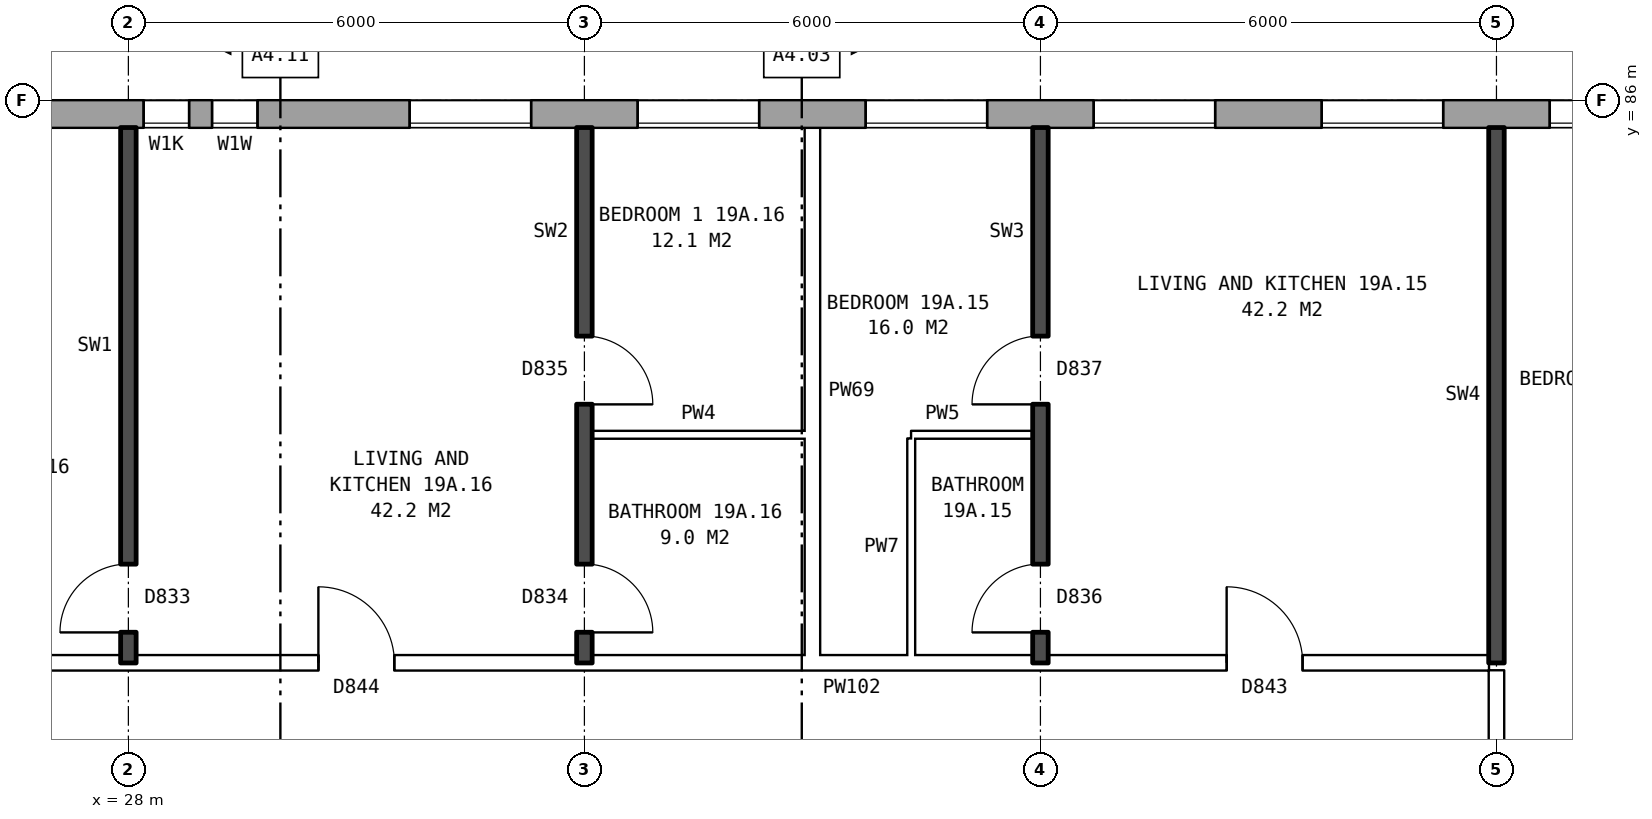
"""IFC4 building model, lengths in metres.
Left out: names, types, materials, properties, quantities, classifications, styles, units other than length and angle.
Written with IfcOpenShell. Run it as: python <this file> out.ifc"""

import sys

from ifc_helpers import new_model, si_unit, direction, frame, frame_2d, origin, place, context, subcontext, project, spatial, rectangle, extrude, element, fill, save


model = new_model("IFC4")
c1 = context("Model", 3, precision=1e-05, world=origin(), true_north=direction((0.0, 1.0)))
c2 = subcontext(c1, "Body", "Model", "MODEL_VIEW")
j1 = project(units=[si_unit("LENGTHUNIT", "METRE"), si_unit("PLANEANGLEUNIT", "RADIAN")], contexts=[c1])
p1 = place(None, origin())
s1 = spatial("IfcSite", under=j1, at=p1, CompositionType="ELEMENT")
p2 = place(p1, origin())
s2 = spatial("IfcBuilding", under=s1, at=p2, CompositionType="ELEMENT")
p3 = place(p2, frame((0.0, 0.0, 71.6)))
s3 = spatial("IfcBuildingStorey", under=s2, at=p3, CompositionType="ELEMENT", Elevation=71.6)
p4 = place(p3, frame((72.925, 85.82, 0.0), z_axis=(0.0, 0.0, 1.0), x_axis=(-1.0, 0.0, 0.0)))
e1 = element("IfcWall", 1, at=p4, inside=s3, PredefinedType="STANDARD", context=c2, shape_type="SweptSolid", body=[
    extrude(rectangle(XDim=46.601, YDim=0.36, at=frame_2d((23.3, 0.0))), origin(), (0.0, 0.0, 1.0), 2.85),
])
p5 = place(p4, frame((0.625, 0.0, 0.8)))
e2 = element("IfcOpeningElement", 2, at=p5, cuts=e1, PredefinedType="OPENING", context=c2, shape_type="SweptSolid", body=[
    extrude(rectangle(XDim=1.6, YDim=1.8, at=frame_2d((0.8, 0.9))), frame((0.0, 0.19, 0.0), z_axis=(0.0, -1.0, 0.0), x_axis=(1.0, 0.0, 0.0)), (0.0, 0.0, 1.0), 0.38),
])
p6 = place(p4, frame((4.625, 0.0, 0.8)))
e3 = element("IfcOpeningElement", 3, at=p6, cuts=e1, PredefinedType="OPENING", context=c2, shape_type="SweptSolid", body=[
    extrude(rectangle(XDim=0.8, YDim=0.9, at=frame_2d((0.4, 0.45))), frame((0.0, 0.19, 0.0), z_axis=(0.0, -1.0, 0.0), x_axis=(1.0, 0.0, 0.0)), (0.0, 0.0, 1.0), 0.38),
])
p7 = place(p4, frame((6.625, 0.0, 0.8)))
e4 = element("IfcOpeningElement", 4, at=p7, cuts=e1, PredefinedType="OPENING", context=c2, shape_type="SweptSolid", body=[
    extrude(rectangle(XDim=1.6, YDim=1.8, at=frame_2d((0.8, 0.9))), frame((0.0, 0.19, 0.0), z_axis=(0.0, -1.0, 0.0), x_axis=(1.0, 0.0, 0.0)), (0.0, 0.0, 1.0), 0.38),
])
p8 = place(p4, frame((9.625, 0.0, 0.8)))
e5 = element("IfcOpeningElement", 5, at=p8, cuts=e1, PredefinedType="OPENING", context=c2, shape_type="SweptSolid", body=[
    extrude(rectangle(XDim=1.6, YDim=1.8, at=frame_2d((0.8, 0.9))), frame((0.0, 0.19, 0.0), z_axis=(0.0, -1.0, 0.0), x_axis=(1.0, 0.0, 0.0)), (0.0, 0.0, 1.0), 0.38),
])
p9 = place(p4, frame((12.625, 0.0, 0.8)))
e6 = element("IfcOpeningElement", 6, at=p9, cuts=e1, PredefinedType="OPENING", context=c2, shape_type="SweptSolid", body=[
    extrude(rectangle(XDim=1.6, YDim=1.8, at=frame_2d((0.8, 0.9))), frame((0.0, 0.19, 0.0), z_axis=(0.0, -1.0, 0.0), x_axis=(1.0, 0.0, 0.0)), (0.0, 0.0, 1.0), 0.38),
])
p10 = place(p4, frame((15.625, 0.0, 0.8)))
e7 = element("IfcOpeningElement", 7, at=p10, cuts=e1, PredefinedType="OPENING", context=c2, shape_type="SweptSolid", body=[
    extrude(rectangle(XDim=1.6, YDim=1.8, at=frame_2d((0.8, 0.9))), frame((0.0, 0.19, 0.0), z_axis=(0.0, -1.0, 0.0), x_axis=(1.0, 0.0, 0.0)), (0.0, 0.0, 1.0), 0.38),
])
p11 = place(p4, frame((18.625, 0.0, 0.8)))
e8 = element("IfcOpeningElement", 8, at=p11, cuts=e1, PredefinedType="OPENING", context=c2, shape_type="SweptSolid", body=[
    extrude(rectangle(XDim=1.6, YDim=1.8, at=frame_2d((0.8, 0.9))), frame((0.0, 0.19, 0.0), z_axis=(0.0, -1.0, 0.0), x_axis=(1.0, 0.0, 0.0)), (0.0, 0.0, 1.0), 0.38),
])
p12 = place(p4, frame((21.625, 0.0, 0.8)))
e9 = element("IfcOpeningElement", 9, at=p12, cuts=e1, PredefinedType="OPENING", context=c2, shape_type="SweptSolid", body=[
    extrude(rectangle(XDim=1.6, YDim=1.8, at=frame_2d((0.8, 0.9))), frame((0.0, 0.19, 0.0), z_axis=(0.0, -1.0, 0.0), x_axis=(1.0, 0.0, 0.0)), (0.0, 0.0, 1.0), 0.38),
])
p13 = place(p4, frame((24.625, 0.0, 0.8)))
e10 = element("IfcOpeningElement", 10, at=p13, cuts=e1, PredefinedType="OPENING", context=c2, shape_type="SweptSolid", body=[
    extrude(rectangle(XDim=1.6, YDim=1.8, at=frame_2d((0.8, 0.9))), frame((0.0, 0.19, 0.0), z_axis=(0.0, -1.0, 0.0), x_axis=(1.0, 0.0, 0.0)), (0.0, 0.0, 1.0), 0.38),
])
p14 = place(p4, frame((27.625, 0.0, 0.8)))
e11 = element("IfcOpeningElement", 11, at=p14, cuts=e1, PredefinedType="OPENING", context=c2, shape_type="SweptSolid", body=[
    extrude(rectangle(XDim=1.6, YDim=1.8, at=frame_2d((0.8, 0.9))), frame((0.0, 0.19, 0.0), z_axis=(0.0, -1.0, 0.0), x_axis=(1.0, 0.0, 0.0)), (0.0, 0.0, 1.0), 0.38),
])
p15 = place(p4, frame((30.625, 0.0, 0.8)))
e12 = element("IfcOpeningElement", 12, at=p15, cuts=e1, PredefinedType="OPENING", context=c2, shape_type="SweptSolid", body=[
    extrude(rectangle(XDim=1.6, YDim=1.8, at=frame_2d((0.8, 0.9))), frame((0.0, 0.19, 0.0), z_axis=(0.0, -1.0, 0.0), x_axis=(1.0, 0.0, 0.0)), (0.0, 0.0, 1.0), 0.38),
])
p16 = place(p4, frame((33.625, 0.0, 0.8)))
e13 = element("IfcOpeningElement", 13, at=p16, cuts=e1, PredefinedType="OPENING", context=c2, shape_type="SweptSolid", body=[
    extrude(rectangle(XDim=1.6, YDim=1.8, at=frame_2d((0.8, 0.9))), frame((0.0, 0.19, 0.0), z_axis=(0.0, -1.0, 0.0), x_axis=(1.0, 0.0, 0.0)), (0.0, 0.0, 1.0), 0.38),
])
p17 = place(p4, frame((36.625, 0.0, 0.8)))
e14 = element("IfcOpeningElement", 14, at=p17, cuts=e1, PredefinedType="OPENING", context=c2, shape_type="SweptSolid", body=[
    extrude(rectangle(XDim=1.6, YDim=1.8, at=frame_2d((0.8, 0.9))), frame((0.0, 0.19, 0.0), z_axis=(0.0, -1.0, 0.0), x_axis=(1.0, 0.0, 0.0)), (0.0, 0.0, 1.0), 0.38),
])
p18 = place(p4, frame((39.625, 0.0, 0.8)))
e15 = element("IfcOpeningElement", 15, at=p18, cuts=e1, PredefinedType="OPENING", context=c2, shape_type="SweptSolid", body=[
    extrude(rectangle(XDim=1.6, YDim=1.8, at=frame_2d((0.8, 0.9))), frame((0.0, 0.19, 0.0), z_axis=(0.0, -1.0, 0.0), x_axis=(1.0, 0.0, 0.0)), (0.0, 0.0, 1.0), 0.38),
])
p19 = place(p4, frame((43.225, 0.0, 1.7)))
e16 = element("IfcOpeningElement", 16, at=p19, cuts=e1, PredefinedType="OPENING", context=c2, shape_type="SweptSolid", body=[
    extrude(rectangle(XDim=0.6, YDim=0.9, at=frame_2d((0.3, 0.45))), frame((0.0, 0.19, 0.0), z_axis=(0.0, -1.0, 0.0), x_axis=(1.0, 0.0, 0.0)), (0.0, 0.0, 1.0), 0.38),
])
p20 = place(p4, frame((5.725, 0.0, 0.8)))
e17 = element("IfcOpeningElement", 17, at=p20, cuts=e1, PredefinedType="OPENING", context=c2, shape_type="SweptSolid", body=[
    extrude(rectangle(XDim=0.6, YDim=1.8, at=frame_2d((0.3, 0.9))), frame((0.0, 0.19, 0.0), z_axis=(0.0, -1.0, 0.0), x_axis=(1.0, 0.0, 0.0)), (0.0, 0.0, 1.0), 0.38),
])
p21 = place(p4, frame((44.125, 0.0, 1.0)))
e18 = element("IfcOpeningElement", 18, at=p21, cuts=e1, PredefinedType="OPENING", context=c2, shape_type="SweptSolid", body=[
    extrude(rectangle(XDim=0.6, YDim=1.5, at=frame_2d((0.3, 0.75))), frame((0.0, 0.19, 0.0), z_axis=(0.0, -1.0, 0.0), x_axis=(1.0, 0.0, 0.0)), (0.0, 0.0, 1.0), 0.38),
])
p22 = place(p3, frame((23.61, 78.6, 0.0), z_axis=(0.0, 0.0, 1.0), x_axis=(1.0, 0.0, 0.0)))
e19 = element("IfcWall", 19, at=p22, inside=s3, PredefinedType="PARTITIONING", context=c2, shape_type="SweptSolid", body=[
    extrude(rectangle(XDim=22.29, YDim=0.2, at=frame_2d((11.145, 0.0))), origin(), (0.0, 0.0, 1.0), 2.85),
])
p23 = place(p22, frame((18.84, 0.0, 0.0)))
e20 = element("IfcOpeningElement", 20, at=p23, cuts=e19, PredefinedType="OPENING", context=c2, shape_type="SweptSolid", body=[
    extrude(rectangle(XDim=1.0, YDim=2.1, at=frame_2d((0.5, 1.05))), frame((0.0, 0.11, 0.0), z_axis=(0.0, -1.0, 0.0), x_axis=(1.0, 0.0, 0.0)), (0.0, 0.0, 1.0), 0.22),
])
p24 = place(p22, frame((6.89, 0.0, 0.0)))
e21 = element("IfcOpeningElement", 21, at=p24, cuts=e19, PredefinedType="OPENING", context=c2, shape_type="SweptSolid", body=[
    extrude(rectangle(XDim=1.0, YDim=2.1, at=frame_2d((0.5, 1.05))), frame((0.0, 0.11, 0.0), z_axis=(0.0, -1.0, 0.0), x_axis=(1.0, 0.0, 0.0)), (0.0, 0.0, 1.0), 0.22),
])
p25 = place(p3, frame((34.1, 81.6, 0.0), z_axis=(0.0, 0.0, 1.0), x_axis=(1.0, 0.0, 0.0)))
e22 = element("IfcWall", 22, at=p25, inside=s3, PredefinedType="PARTITIONING", context=c2, shape_type="SweptSolid", body=[
    extrude(rectangle(XDim=2.8, YDim=0.1, at=frame_2d((1.4, 0.0))), origin(), (0.0, 0.0, 1.0), 2.85),
])
p26 = place(p3, frame((38.3, 81.6, 0.0), z_axis=(0.0, 0.0, 1.0), x_axis=(1.0, 0.0, 0.0)))
e23 = element("IfcWall", 23, at=p26, inside=s3, PredefinedType="PARTITIONING", context=c2, shape_type="SweptSolid", body=[
    extrude(rectangle(XDim=1.6, YDim=0.1, at=frame_2d((0.8, 0.0))), origin(), (0.0, 0.0, 1.0), 2.85),
])
p27 = place(p3, frame((28.0, 78.6, 0.0), z_axis=(0.0, 0.0, 1.0), x_axis=(0.0, 1.0, 0.0)))
e24 = element("IfcWall", 24, at=p27, inside=s3, PredefinedType="SOLIDWALL", context=c2, shape_type="SweptSolid", body=[
    extrude(rectangle(XDim=7.04, YDim=0.2, at=frame_2d((3.52, 0.0))), origin(), (0.0, 0.0, 1.0), 2.85),
])
p28 = place(p27, frame((0.4, 0.0, 0.0)))
e25 = element("IfcOpeningElement", 25, at=p28, cuts=e24, PredefinedType="OPENING", context=c2, shape_type="SweptSolid", body=[
    extrude(rectangle(XDim=0.9, YDim=2.1, at=frame_2d((0.45, 1.05))), frame((0.0, 0.11, 0.0), z_axis=(0.0, -1.0, 0.0), x_axis=(1.0, 0.0, 0.0)), (0.0, 0.0, 1.0), 0.22),
])
p29 = place(p3, frame((34.0, 78.6, 0.0), z_axis=(0.0, 0.0, 1.0), x_axis=(0.0, 1.0, 0.0)))
e26 = element("IfcWall", 26, at=p29, inside=s3, PredefinedType="SOLIDWALL", context=c2, shape_type="SweptSolid", body=[
    extrude(rectangle(XDim=7.04, YDim=0.2, at=frame_2d((3.52, 0.0))), origin(), (0.0, 0.0, 1.0), 2.85),
])
p30 = place(p29, frame((3.4, 0.0, 0.0)))
e27 = element("IfcOpeningElement", 27, at=p30, cuts=e26, PredefinedType="OPENING", context=c2, shape_type="SweptSolid", body=[
    extrude(rectangle(XDim=0.9, YDim=2.1, at=frame_2d((0.45, 1.05))), frame((0.0, 0.11, 0.0), z_axis=(0.0, -1.0, 0.0), x_axis=(1.0, 0.0, 0.0)), (0.0, 0.0, 1.0), 0.22),
])
p31 = place(p29, frame((0.4, 0.0, 0.0)))
e28 = element("IfcOpeningElement", 28, at=p31, cuts=e26, PredefinedType="OPENING", context=c2, shape_type="SweptSolid", body=[
    extrude(rectangle(XDim=0.9, YDim=2.1, at=frame_2d((0.45, 1.05))), frame((0.0, 0.11, 0.0), z_axis=(0.0, -1.0, 0.0), x_axis=(1.0, 0.0, 0.0)), (0.0, 0.0, 1.0), 0.22),
])
p32 = place(p3, frame((37.0, 78.7, 0.0), z_axis=(0.0, 0.0, 1.0), x_axis=(0.0, 1.0, 0.0)))
e29 = element("IfcWall", 29, at=p32, inside=s3, PredefinedType="PARTITIONING", context=c2, shape_type="SweptSolid", body=[
    extrude(rectangle(XDim=6.94, YDim=0.2, at=frame_2d((3.47, 0.0))), origin(), (0.0, 0.0, 1.0), 2.85),
])
p33 = place(p3, frame((38.3, 78.7, 0.0), z_axis=(0.0, 0.0, 1.0), x_axis=(0.0, 1.0, 0.0)))
e30 = element("IfcWall", 30, at=p33, inside=s3, PredefinedType="PARTITIONING", context=c2, shape_type="SweptSolid", body=[
    extrude(rectangle(XDim=2.85, YDim=0.1, at=frame_2d((1.425, 0.0))), origin(), (0.0, 0.0, 1.0), 2.85),
])
p34 = place(p3, frame((40.0, 78.6, 0.0), z_axis=(0.0, 0.0, 1.0), x_axis=(0.0, 1.0, 0.0)))
e31 = element("IfcWall", 31, at=p34, inside=s3, PredefinedType="SOLIDWALL", context=c2, shape_type="SweptSolid", body=[
    extrude(rectangle(XDim=7.04, YDim=0.2, at=frame_2d((3.52, 0.0))), origin(), (0.0, 0.0, 1.0), 2.85),
])
p35 = place(p34, frame((3.4, 0.0, 0.0)))
e32 = element("IfcOpeningElement", 32, at=p35, cuts=e31, PredefinedType="OPENING", context=c2, shape_type="SweptSolid", body=[
    extrude(rectangle(XDim=0.9, YDim=2.1, at=frame_2d((0.45, 1.05))), frame((0.0, 0.11, 0.0), z_axis=(0.0, -1.0, 0.0), x_axis=(1.0, 0.0, 0.0)), (0.0, 0.0, 1.0), 0.22),
])
p36 = place(p34, frame((0.4, 0.0, 0.0)))
e33 = element("IfcOpeningElement", 33, at=p36, cuts=e31, PredefinedType="OPENING", context=c2, shape_type="SweptSolid", body=[
    extrude(rectangle(XDim=0.9, YDim=2.1, at=frame_2d((0.45, 1.05))), frame((0.0, 0.11, 0.0), z_axis=(0.0, -1.0, 0.0), x_axis=(1.0, 0.0, 0.0)), (0.0, 0.0, 1.0), 0.22),
])
p37 = place(p3, frame((46.0, 76.3, 0.0), z_axis=(0.0, 0.0, 1.0), x_axis=(0.0, 1.0, 0.0)))
e34 = element("IfcWall", 34, at=p37, inside=s3, PredefinedType="PARTITIONING", context=c2, shape_type="SweptSolid", body=[
    extrude(rectangle(XDim=2.2, YDim=0.2, at=frame_2d((1.1, 0.0))), origin(), (0.0, 0.0, 1.0), 2.85),
])
p38 = place(p3, frame((46.0, 78.6, 0.0), z_axis=(0.0, 0.0, 1.0), x_axis=(0.0, 1.0, 0.0)))
e35 = element("IfcWall", 35, at=p38, inside=s3, PredefinedType="SOLIDWALL", context=c2, shape_type="SweptSolid", body=[
    extrude(rectangle(XDim=7.04, YDim=0.2, at=frame_2d((3.52, 0.0))), origin(), (0.0, 0.0, 1.0), 2.85),
])
p39 = place(p13, origin())
e36 = element("IfcWindow", 36, at=p39, inside=s3, PartitioningType="SINGLE_PANEL", PredefinedType="WINDOW", context=c2, shape_type="SweptSolid", body=[
    extrude(rectangle(XDim=1.6, YDim=1.8, at=frame_2d((0.8, 0.9))), frame((0.0, 0.15, 0.0), z_axis=(0.0, -1.0, 0.0), x_axis=(1.0, 0.0, 0.0)), (0.0, 0.0, 1.0), 0.06),
])
fill(e10, e36)
p40 = place(p14, origin())
e37 = element("IfcWindow", 37, at=p40, inside=s3, PartitioningType="SINGLE_PANEL", PredefinedType="WINDOW", context=c2, shape_type="SweptSolid", body=[
    extrude(rectangle(XDim=1.6, YDim=1.8, at=frame_2d((0.8, 0.9))), frame((0.0, 0.15, 0.0), z_axis=(0.0, -1.0, 0.0), x_axis=(1.0, 0.0, 0.0)), (0.0, 0.0, 1.0), 0.06),
])
fill(e11, e37)
p41 = place(p15, origin())
e38 = element("IfcWindow", 38, at=p41, inside=s3, PartitioningType="SINGLE_PANEL", PredefinedType="WINDOW", context=c2, shape_type="SweptSolid", body=[
    extrude(rectangle(XDim=1.6, YDim=1.8, at=frame_2d((0.8, 0.9))), frame((0.0, 0.15, 0.0), z_axis=(0.0, -1.0, 0.0), x_axis=(1.0, 0.0, 0.0)), (0.0, 0.0, 1.0), 0.06),
])
fill(e12, e38)
p42 = place(p16, origin())
e39 = element("IfcWindow", 39, at=p42, inside=s3, PartitioningType="SINGLE_PANEL", PredefinedType="WINDOW", context=c2, shape_type="SweptSolid", body=[
    extrude(rectangle(XDim=1.6, YDim=1.8, at=frame_2d((0.8, 0.9))), frame((0.0, 0.15, 0.0), z_axis=(0.0, -1.0, 0.0), x_axis=(1.0, 0.0, 0.0)), (0.0, 0.0, 1.0), 0.06),
])
fill(e13, e39)
p43 = place(p17, origin())
e40 = element("IfcWindow", 40, at=p43, inside=s3, PartitioningType="SINGLE_PANEL", PredefinedType="WINDOW", context=c2, shape_type="SweptSolid", body=[
    extrude(rectangle(XDim=1.6, YDim=1.8, at=frame_2d((0.8, 0.9))), frame((0.0, 0.15, 0.0), z_axis=(0.0, -1.0, 0.0), x_axis=(1.0, 0.0, 0.0)), (0.0, 0.0, 1.0), 0.06),
])
fill(e14, e40)
p44 = place(p18, origin())
e41 = element("IfcWindow", 41, at=p44, inside=s3, PartitioningType="SINGLE_PANEL", PredefinedType="WINDOW", context=c2, shape_type="SweptSolid", body=[
    extrude(rectangle(XDim=1.6, YDim=1.8, at=frame_2d((0.8, 0.9))), frame((0.0, 0.15, 0.0), z_axis=(0.0, -1.0, 0.0), x_axis=(1.0, 0.0, 0.0)), (0.0, 0.0, 1.0), 0.06),
])
fill(e15, e41)
p45 = place(p19, origin())
e42 = element("IfcWindow", 42, at=p45, inside=s3, PartitioningType="SINGLE_PANEL", PredefinedType="WINDOW", context=c2, shape_type="SweptSolid", body=[
    extrude(rectangle(XDim=0.6, YDim=0.9, at=frame_2d((0.3, 0.45))), frame((0.0, 0.15, 0.0), z_axis=(0.0, -1.0, 0.0), x_axis=(1.0, 0.0, 0.0)), (0.0, 0.0, 1.0), 0.06),
])
fill(e16, e42)
p46 = place(p35, origin())
e43 = element("IfcDoor", 43, at=p46, inside=s3, OperationType="SINGLE_SWING_LEFT", PredefinedType="DOOR", context=c2, shape_type="SweptSolid", body=[
    extrude(rectangle(XDim=0.9, YDim=2.1, at=frame_2d((0.45, 1.05))), frame((0.0, 0.025, 0.0), z_axis=(0.0, -1.0, 0.0), x_axis=(1.0, 0.0, 0.0)), (0.0, 0.0, 1.0), 0.05),
])
fill(e32, e43)
p47 = place(p23, origin())
e44 = element("IfcDoor", 44, at=p47, inside=s3, OperationType="SINGLE_SWING_LEFT", PredefinedType="DOOR", context=c2, shape_type="SweptSolid", body=[
    extrude(rectangle(XDim=1.0, YDim=2.1, at=frame_2d((0.5, 1.05))), frame((0.0, 0.025, 0.0), z_axis=(0.0, -1.0, 0.0), x_axis=(1.0, 0.0, 0.0)), (0.0, 0.0, 1.0), 0.05),
])
fill(e20, e44)
p48 = place(p36, origin())
e45 = element("IfcDoor", 45, at=p48, inside=s3, OperationType="SINGLE_SWING_LEFT", PredefinedType="DOOR", context=c2, shape_type="SweptSolid", body=[
    extrude(rectangle(XDim=0.9, YDim=2.1, at=frame_2d((0.45, 1.05))), frame((0.0, 0.025, 0.0), z_axis=(0.0, -1.0, 0.0), x_axis=(1.0, 0.0, 0.0)), (0.0, 0.0, 1.0), 0.05),
])
fill(e33, e45)
p49 = place(p30, frame((0.9, 0.0, 0.0), z_axis=(0.0, 0.0, 1.0), x_axis=(-1.0, 0.0, 0.0)))
e46 = element("IfcDoor", 46, at=p49, inside=s3, OperationType="SINGLE_SWING_RIGHT", PredefinedType="DOOR", context=c2, shape_type="SweptSolid", body=[
    extrude(rectangle(XDim=0.9, YDim=2.1, at=frame_2d((0.45, 1.05))), frame((0.0, 0.025, 0.0), z_axis=(0.0, -1.0, 0.0), x_axis=(1.0, 0.0, 0.0)), (0.0, 0.0, 1.0), 0.05),
])
fill(e27, e46)
p50 = place(p28, origin())
e47 = element("IfcDoor", 47, at=p50, inside=s3, OperationType="SINGLE_SWING_LEFT", PredefinedType="DOOR", context=c2, shape_type="SweptSolid", body=[
    extrude(rectangle(XDim=0.9, YDim=2.1, at=frame_2d((0.45, 1.05))), frame((0.0, 0.025, 0.0), z_axis=(0.0, -1.0, 0.0), x_axis=(1.0, 0.0, 0.0)), (0.0, 0.0, 1.0), 0.05),
])
fill(e25, e47)
p51 = place(p24, origin())
e48 = element("IfcDoor", 48, at=p51, inside=s3, OperationType="SINGLE_SWING_LEFT", PredefinedType="DOOR", context=c2, shape_type="SweptSolid", body=[
    extrude(rectangle(XDim=1.0, YDim=2.1, at=frame_2d((0.5, 1.05))), frame((0.0, 0.025, 0.0), z_axis=(0.0, -1.0, 0.0), x_axis=(1.0, 0.0, 0.0)), (0.0, 0.0, 1.0), 0.05),
])
fill(e21, e48)
p52 = place(p31, frame((0.9, 0.0, 0.0), z_axis=(0.0, 0.0, 1.0), x_axis=(-1.0, 0.0, 0.0)))
e49 = element("IfcDoor", 49, at=p52, inside=s3, OperationType="SINGLE_SWING_RIGHT", PredefinedType="DOOR", context=c2, shape_type="SweptSolid", body=[
    extrude(rectangle(XDim=0.9, YDim=2.1, at=frame_2d((0.45, 1.05))), frame((0.0, 0.025, 0.0), z_axis=(0.0, -1.0, 0.0), x_axis=(1.0, 0.0, 0.0)), (0.0, 0.0, 1.0), 0.05),
])
fill(e28, e49)
p53 = place(p21, origin())
e50 = element("IfcWindow", 50, at=p53, inside=s3, PartitioningType="SINGLE_PANEL", PredefinedType="WINDOW", context=c2, shape_type="SweptSolid", body=[
    extrude(rectangle(XDim=0.6, YDim=1.5, at=frame_2d((0.3, 0.75))), frame((0.0, 0.15, 0.0), z_axis=(0.0, -1.0, 0.0), x_axis=(1.0, 0.0, 0.0)), (0.0, 0.0, 1.0), 0.06),
])
fill(e18, e50)
save(model, sys.argv[1])
